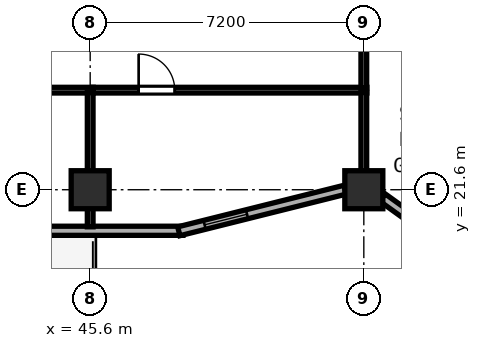
"""IFC4 building model, lengths in metres.
Left out: names, types, materials, properties, quantities, classifications, styles, units other than length and angle.
Written with IfcOpenShell. Run it as: python <this file> out.ifc"""

import sys

from ifc_helpers import new_model, si_unit, direction, frame, frame_2d, origin, origin_2d, place, context, subcontext, project, spatial, rectangle, hollow_rectangle, extrude, element, fill, save


model = new_model("IFC4")
c1 = context("Model", 3, precision=1e-05, world=origin(), true_north=direction((0.0, 1.0)))
c2 = subcontext(c1, "Body", "Model", "MODEL_VIEW")
j1 = project(units=[si_unit("LENGTHUNIT", "METRE"), si_unit("PLANEANGLEUNIT", "RADIAN")], contexts=[c1])
p1 = place(None, origin())
s1 = spatial("IfcSite", under=j1, at=p1, CompositionType="ELEMENT")
p2 = place(p1, origin())
s2 = spatial("IfcBuilding", under=s1, at=p2, CompositionType="ELEMENT")
p3 = place(p2, frame((0.0, 0.0, 128.8)))
s3 = spatial("IfcBuildingStorey", under=s2, at=p3, CompositionType="ELEMENT", Elevation=128.8)
for number, where, z_axis, x_axis in (
    (1, (52.8, 21.6, 0.0), (0.0, 0.0, 1.0), (1.0, 0.0, 0.0)),
    (2, (45.6, 21.6, 0.0), (0.0, 0.0, 1.0), (1.0, 0.0, 0.0)),
):
    element("IfcColumn", number, at=place(p3, frame(where, z_axis=z_axis, x_axis=x_axis)), inside=s3, PredefinedType="COLUMN", context=c2, shape_type="SweptSolid", body=[
        extrude(hollow_rectangle(XDim=1.0, YDim=1.0, WallThickness=0.038, at=origin_2d()), origin(), (0.0, 0.0, 1.0), 3.8),
    ])
p4 = place(p3, frame((28.76, 20.52, 0.0), z_axis=(0.0, 0.0, 1.0), x_axis=(1.0, 0.0, 0.0)))
e3 = element("IfcWall", 3, at=p4, inside=s3, PredefinedType="SOLIDWALL", context=c2, shape_type="SweptSolid", body=[
    extrude(rectangle(XDim=19.281, YDim=0.24, at=frame_2d((9.64, 0.0))), origin(), (0.0, 0.0, 1.0), 3.6),
])
p5 = place(p4, frame((15.64, 0.0, 0.0), z_axis=(0.0, 0.0, 1.0), x_axis=(-1.0, 0.0, 0.0)))
e4 = element("IfcOpeningElement", 4, at=p5, cuts=e3, PredefinedType="OPENING", context=c2, shape_type="SweptSolid", body=[
    extrude(rectangle(XDim=1.2, YDim=2.15, at=frame_2d((0.6, 1.075))), frame((0.0, 0.13, 0.0), z_axis=(0.0, -1.0, 0.0), x_axis=(1.0, 0.0, 0.0)), (0.0, 0.0, 1.0), 0.26),
])
p6 = place(p3, frame((47.932, 20.507, 0.0), z_axis=(0.0, 0.0, 1.0), x_axis=(0.970145683738, 0.242522890311, 0.0)))
e5 = element("IfcWall", 5, at=p6, inside=s3, PredefinedType="SOLIDWALL", context=c2, shape_type="SweptSolid", body=[
    extrude(rectangle(XDim=4.511, YDim=0.24, at=frame_2d((2.255, 0.0))), origin(), (0.0, 0.0, 1.0), 3.145),
])
p7 = place(p6, frame((0.7, 0.0, 0.85)))
e6 = element("IfcOpeningElement", 6, at=p7, cuts=e5, PredefinedType="OPENING", context=c2, shape_type="SweptSolid", body=[
    extrude(rectangle(XDim=1.15, YDim=1.8, at=frame_2d((0.575, 0.9))), frame((0.0, 0.13, 0.0), z_axis=(0.0, -1.0, 0.0), x_axis=(1.0, 0.0, 0.0)), (0.0, 0.0, 1.0), 0.26),
])
p8 = place(p3, frame((53.292, 21.394, 0.0), z_axis=(0.0, 0.0, 1.0), x_axis=(0.811543504691, -0.584291998913, 0.0)))
e7 = element("IfcWall", 7, at=p8, inside=s3, PredefinedType="SOLIDWALL", context=c2, shape_type="SweptSolid", body=[
    extrude(rectangle(XDim=11.623, YDim=0.24, at=frame_2d((5.812, 0.0))), origin(), (0.0, 0.0, 1.0), 3.145),
])
p9 = place(p8, frame((0.7, 0.0, 0.85)))
e8 = element("IfcOpeningElement", 8, at=p9, cuts=e7, PredefinedType="OPENING", context=c2, shape_type="SweptSolid", body=[
    extrude(rectangle(XDim=1.15, YDim=1.8, at=frame_2d((0.575, 0.9))), frame((0.0, 0.13, 0.0), z_axis=(0.0, -1.0, 0.0), x_axis=(1.0, 0.0, 0.0)), (0.0, 0.0, 1.0), 0.26),
])
p10 = place(p8, frame((6.1, 0.0, 0.85)))
e9 = element("IfcOpeningElement", 9, at=p10, cuts=e7, PredefinedType="OPENING", context=c2, shape_type="SweptSolid", body=[
    extrude(rectangle(XDim=1.15, YDim=1.8, at=frame_2d((0.575, 0.9))), frame((0.0, 0.13, 0.0), z_axis=(0.0, -1.0, 0.0), x_axis=(1.0, 0.0, 0.0)), (0.0, 0.0, 1.0), 0.26),
])
p11 = place(p3, frame((38.482, 24.22, 0.0), z_axis=(0.0, 0.0, 1.0), x_axis=(1.0, 0.0, 0.0)))
e10 = element("IfcWall", 10, at=p11, inside=s3, PredefinedType="PARTITIONING", context=c2, shape_type="SweptSolid", body=[
    extrude(rectangle(XDim=7.198, YDim=0.15, at=frame_2d((3.599, 0.0))), origin(), (0.0, 0.0, 1.0), 3.6),
])
p12 = place(p11, frame((3.913, 0.0, 0.0), z_axis=(0.0, 0.0, 1.0), x_axis=(-1.0, 0.0, 0.0)))
e11 = element("IfcOpeningElement", 11, at=p12, cuts=e10, PredefinedType="OPENING", context=c2, shape_type="SweptSolid", body=[
    extrude(rectangle(XDim=0.95, YDim=2.12, at=frame_2d((0.475, 1.06))), frame((0.0, 0.085, 0.0), z_axis=(0.0, -1.0, 0.0), x_axis=(1.0, 0.0, 0.0)), (0.0, 0.0, 1.0), 0.17),
])
p13 = place(p3, frame((45.6, 20.625, 0.0), z_axis=(0.0, 0.0, 1.0), x_axis=(0.0, 1.0, 0.0)))
e12 = element("IfcWall", 12, at=p13, inside=s3, PredefinedType="PARTITIONING", context=c2, shape_type="SweptSolid", body=[
    extrude(rectangle(XDim=3.535, YDim=0.15, at=frame_2d((1.768, 0.0))), origin(), (0.0, 0.0, 1.0), 3.085),
])
p14 = place(p3, frame((45.682, 24.22, 0.0), z_axis=(0.0, 0.0, 1.0), x_axis=(1.0, 0.0, 0.0)))
e13 = element("IfcWall", 13, at=p14, inside=s3, PredefinedType="PARTITIONING", context=c2, shape_type="SweptSolid", body=[
    extrude(rectangle(XDim=7.198, YDim=0.15, at=frame_2d((3.599, 0.0))), origin(), (0.0, 0.0, 1.0), 3.6),
])
p15 = place(p14, frame((2.143, 0.0, 0.0), z_axis=(0.0, 0.0, 1.0), x_axis=(-1.0, 0.0, 0.0)))
e14 = element("IfcOpeningElement", 14, at=p15, cuts=e13, PredefinedType="OPENING", context=c2, shape_type="SweptSolid", body=[
    extrude(rectangle(XDim=0.95, YDim=2.12, at=frame_2d((0.475, 1.06))), frame((0.0, 0.085, 0.0), z_axis=(0.0, -1.0, 0.0), x_axis=(1.0, 0.0, 0.0)), (0.0, 0.0, 1.0), 0.17),
])
p16 = place(p3, frame((52.8, 21.819, 0.0), z_axis=(0.0, 0.0, 1.0), x_axis=(0.0, 1.0, 0.0)))
e15 = element("IfcWall", 15, at=p16, inside=s3, PredefinedType="PARTITIONING", context=c2, shape_type="SweptSolid", body=[
    extrude(rectangle(XDim=2.341, YDim=0.15, at=frame_2d((1.171, 0.0))), origin(), (0.0, 0.0, 1.0), 3.145),
])
p17 = place(p3, frame((52.8, 24.28, 0.0), z_axis=(0.0, 0.0, 1.0), x_axis=(0.0, 1.0, 0.0)))
e16 = element("IfcWall", 16, at=p17, inside=s3, PredefinedType="PARTITIONING", context=c2, shape_type="SweptSolid", body=[
    extrude(rectangle(XDim=4.03, YDim=0.15, at=frame_2d((2.015, 0.0))), origin(), (0.0, 0.0, 1.0), 3.145),
])
p18 = place(p7, origin())
e17 = element("IfcWindow", 17, at=p18, inside=s3, PartitioningType="SINGLE_PANEL", PredefinedType="WINDOW", context=c2, shape_type="SweptSolid", body=[
    extrude(rectangle(XDim=1.15, YDim=1.8, at=frame_2d((0.575, 0.9))), frame((0.0, 0.03, 0.0), z_axis=(0.0, -1.0, 0.0), x_axis=(1.0, 0.0, 0.0)), (0.0, 0.0, 1.0), 0.06),
])
fill(e6, e17)
p19 = place(p15, origin())
e18 = element("IfcDoor", 18, at=p19, inside=s3, OperationType="SINGLE_SWING_RIGHT", PredefinedType="DOOR", context=c2, shape_type="SweptSolid", body=[
    extrude(rectangle(XDim=0.95, YDim=2.12, at=frame_2d((0.475, 1.06))), frame((0.0, 0.025, 0.0), z_axis=(0.0, -1.0, 0.0), x_axis=(1.0, 0.0, 0.0)), (0.0, 0.0, 1.0), 0.05),
])
fill(e14, e18)
save(model, sys.argv[1])
